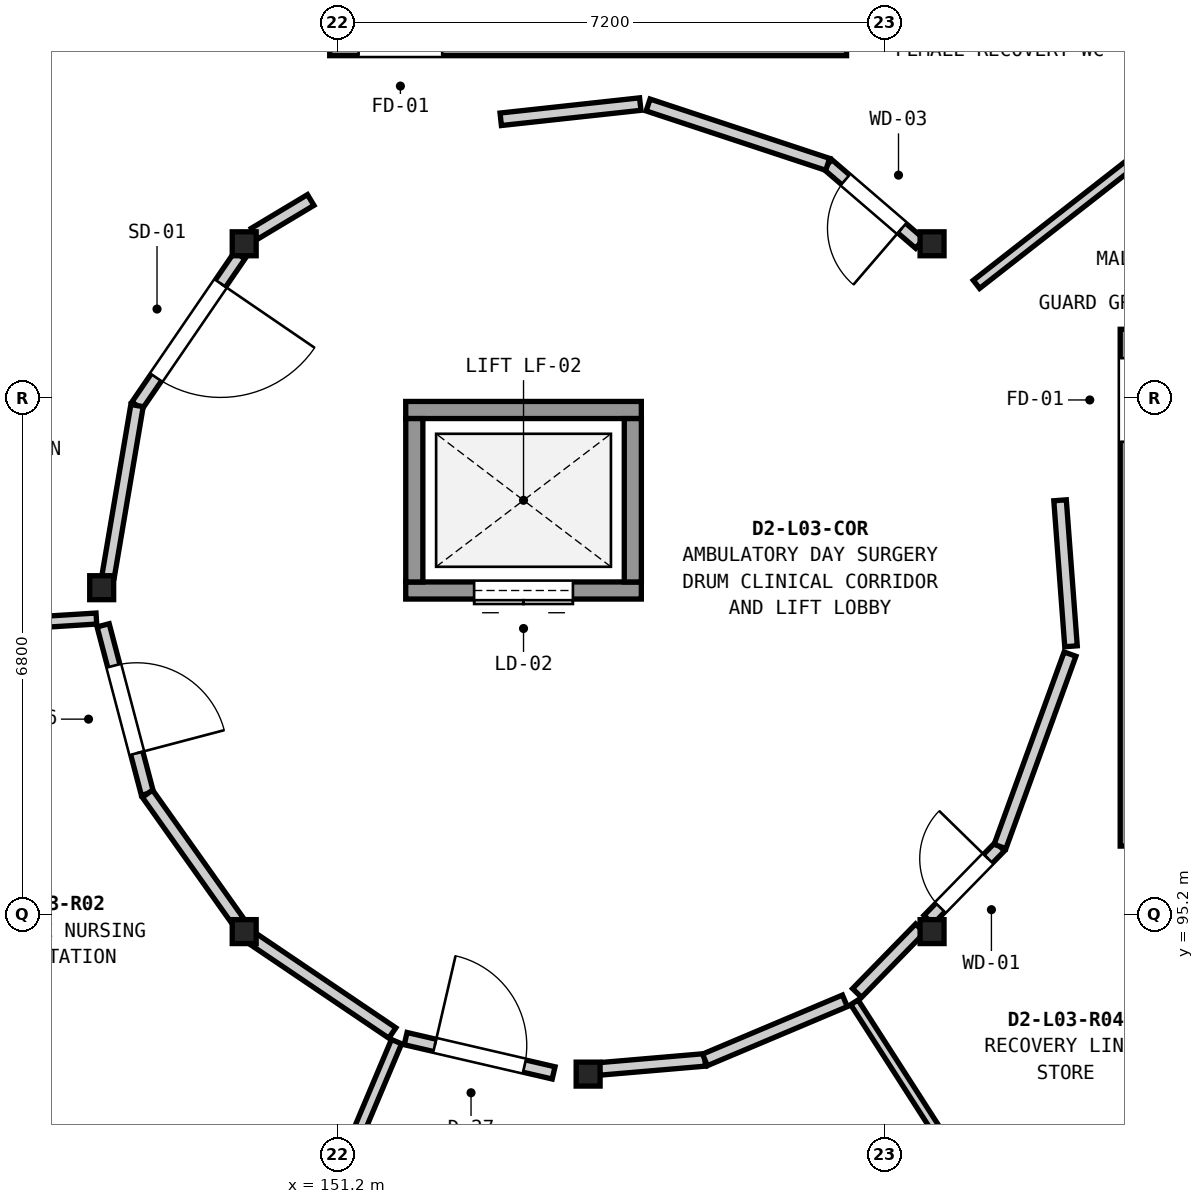
"""IFC4 building model, lengths in metres.
Left out: names, types, materials, properties, quantities, classifications, styles, units other than length and angle.
Written with IfcOpenShell. Run it as: python <this file> out.ifc"""

import sys

from ifc_helpers import new_model, si_unit, direction, frame, frame_2d, origin, origin_2d, place, context, subcontext, project, spatial, rectangle, extrude, element, fill, save


model = new_model("IFC4")
c1 = context("Model", 3, precision=1e-05, world=origin(), true_north=direction((0.0, 1.0)))
c2 = subcontext(c1, "Body", "Model", "MODEL_VIEW")
j1 = project(units=[si_unit("LENGTHUNIT", "METRE"), si_unit("PLANEANGLEUNIT", "RADIAN")], contexts=[c1])
p1 = place(None, origin())
s1 = spatial("IfcSite", under=j1, at=p1, CompositionType="ELEMENT")
p2 = place(p1, origin())
s2 = spatial("IfcBuilding", under=s1, at=p2, CompositionType="ELEMENT")
p3 = place(p2, frame((0.0, 0.0, 12.95)))
s3 = spatial("IfcBuildingStorey", under=s2, at=p3, CompositionType="ELEMENT", Elevation=12.95)
for number, where, z_axis, x_axis in (
    (1, (159.025, 104.025, 0.0), (0.0, 0.0, 1.0), (1.0, 0.0, 0.0)),
    (2, (149.975, 104.025, 0.0), (0.0, 0.0, 1.0), (1.0, 0.0, 0.0)),
    (3, (148.1, 99.5, 0.0), (0.0, 0.0, 1.0), (1.0, 0.0, 0.0)),
    (4, (149.975, 94.975, 0.0), (0.0, 0.0, 1.0), (1.0, 0.0, 0.0)),
    (5, (154.5, 93.1, 0.0), (0.0, 0.0, 1.0), (1.0, 0.0, 0.0)),
    (6, (159.025, 94.975, 0.0), (0.0, 0.0, 1.0), (1.0, 0.0, 0.0)),
):
    element("IfcColumn", number, at=place(p3, frame(where, z_axis=z_axis, x_axis=x_axis)), inside=s3, PredefinedType="COLUMN", context=c2, shape_type="SweptSolid", body=[
        extrude(rectangle(XDim=0.315, YDim=0.315, at=origin_2d()), origin(), (0.0, 0.0, 1.0), 4.2),
    ])
p4 = place(p3, frame((161.6, 102.9, 0.0), z_axis=(0.0, 0.0, 1.0), x_axis=(0.0, -1.0, 0.0)))
e7 = element("IfcWall", 7, at=p4, inside=s3, PredefinedType="SHEAR", context=c2, shape_type="SweptSolid", body=[
    extrude(rectangle(XDim=6.8, YDim=0.2, at=frame_2d((3.4, 0.0))), origin(), (0.0, 0.0, 1.0), 3.96),
])
p5 = place(p4, frame((0.38, 0.0, 0.0)))
e8 = element("IfcOpeningElement", 8, at=p5, cuts=e7, PredefinedType="OPENING", context=c2, shape_type="SweptSolid", body=[
    extrude(rectangle(XDim=1.1, YDim=2.15, at=frame_2d((0.55, 1.075))), frame((0.0, 0.11, 0.0), z_axis=(0.0, -1.0, 0.0), x_axis=(1.0, 0.0, 0.0)), (0.0, 0.0, 1.0), 0.22),
])
p6 = place(p3, frame((151.1, 106.6, 0.0), z_axis=(0.0, 0.0, 1.0), x_axis=(1.0, 0.0, 0.0)))
e9 = element("IfcWall", 9, at=p6, inside=s3, PredefinedType="SHEAR", context=c2, shape_type="SweptSolid", body=[
    extrude(rectangle(XDim=6.8, YDim=0.2, at=frame_2d((3.4, 0.0))), origin(), (0.0, 0.0, 1.0), 3.96),
])
p7 = place(p6, frame((0.38, 0.0, 0.0)))
e10 = element("IfcOpeningElement", 10, at=p7, cuts=e9, PredefinedType="OPENING", context=c2, shape_type="SweptSolid", body=[
    extrude(rectangle(XDim=1.1, YDim=2.15, at=frame_2d((0.55, 1.075))), frame((0.0, 0.11, 0.0), z_axis=(0.0, -1.0, 0.0), x_axis=(1.0, 0.0, 0.0)), (0.0, 0.0, 1.0), 0.22),
])
p8 = place(p3, frame((152.1, 99.463, 0.0), z_axis=(0.0, 0.0, 1.0), x_axis=(1.0, 0.0, 0.0)))
e11 = element("IfcWall", 11, at=p8, inside=s3, PredefinedType="SHEAR", context=c2, shape_type="SweptSolid", body=[
    extrude(rectangle(XDim=3.1, YDim=0.225, at=frame_2d((1.55, 0.0))), origin(), (0.0, 0.0, 1.0), 3.96),
])
p9 = place(p8, frame((0.9, 0.0, 0.0)))
e12 = element("IfcOpeningElement", 12, at=p9, cuts=e11, PredefinedType="OPENING", context=c2, shape_type="SweptSolid", body=[
    extrude(rectangle(XDim=1.3, YDim=2.2, at=frame_2d((0.65, 1.1))), frame((0.0, 0.123, 0.0), z_axis=(0.0, -1.0, 0.0), x_axis=(1.0, 0.0, 0.0)), (0.0, 0.0, 1.0), 0.245),
])
p10 = place(p3, frame((152.1, 101.838, 0.0), z_axis=(0.0, 0.0, 1.0), x_axis=(1.0, 0.0, 0.0)))
e13 = element("IfcWall", 13, at=p10, inside=s3, PredefinedType="SHEAR", context=c2, shape_type="SweptSolid", body=[
    extrude(rectangle(XDim=3.1, YDim=0.225, at=frame_2d((1.55, 0.0))), origin(), (0.0, 0.0, 1.0), 3.96),
])
for number, where, z_axis, x_axis in (
    (14, (152.213, 99.575, 0.0), (0.0, 0.0, 1.0), (0.0, 1.0, 0.0)),
    (15, (155.088, 99.575, 0.0), (0.0, 0.0, 1.0), (0.0, 1.0, 0.0)),
):
    element("IfcWall", number, at=place(p3, frame(where, z_axis=z_axis, x_axis=x_axis)), inside=s3, PredefinedType="SHEAR", context=c2, shape_type="SweptSolid", body=[
        extrude(rectangle(XDim=2.15, YDim=0.225, at=frame_2d((1.075, 0.0))), origin(), (0.0, 0.0, 1.0), 3.96),
    ])
p11 = place(p3, frame((148.03, 99.094, 0.0), z_axis=(0.0, 0.0, 1.0), x_axis=(-0.998041214069, -0.062559851498, 0.0)))
e16 = element("IfcWall", 16, at=p11, inside=s3, PredefinedType="PARTITIONING", context=c2, shape_type="SweptSolid", body=[
    extrude(rectangle(XDim=4.269, YDim=0.145, at=frame_2d((2.135, 0.0))), origin(), (0.0, 0.0, 1.0), 3.279),
])
p12 = place(p3, frame((151.979, 93.527, 0.0), z_axis=(0.0, 0.0, 1.0), x_axis=(-0.388824533624, -0.921311826719, 0.0)))
e17 = element("IfcWall", 17, at=p12, inside=s3, PredefinedType="PARTITIONING", context=c2, shape_type="SweptSolid", body=[
    extrude(rectangle(XDim=4.308, YDim=0.145, at=frame_2d((2.154, 0.0))), origin(), (0.0, 0.0, 1.0), 3.279),
])
p13 = place(p3, frame((158.003, 94.045, 0.0), z_axis=(0.0, 0.0, 1.0), x_axis=(0.540341175476, -0.841446025652, 0.0)))
e18 = element("IfcWall", 18, at=p13, inside=s3, PredefinedType="PARTITIONING", context=c2, shape_type="SweptSolid", body=[
    extrude(rectangle(XDim=4.297, YDim=0.115, at=frame_2d((2.149, 0.0))), origin(), (0.0, 0.0, 1.0), 3.279),
])
p14 = place(p3, frame((159.609, 103.491, 0.0), z_axis=(0.0, 0.0, 1.0), x_axis=(0.787898546349, 0.615805067096, 0.0)))
e19 = element("IfcWall", 19, at=p14, inside=s3, PredefinedType="PLUMBINGWALL", context=c2, shape_type="SweptSolid", body=[
    extrude(rectangle(XDim=4.266, YDim=0.135, at=frame_2d((2.133, 0.0))), origin(), (0.0, 0.0, 1.0), 3.279),
])
p15 = place(p3, frame((155.186, 105.863, 0.0), z_axis=(0.0, 0.0, 1.0), x_axis=(-0.994121595033, -0.108269359885, 0.0)))
e20 = element("IfcWall", 20, at=p15, inside=s3, PredefinedType="PARTITIONING", context=c2, shape_type="SweptSolid", body=[
    extrude(rectangle(XDim=1.847, YDim=0.165, at=frame_2d((0.923, 0.0))), origin(), (0.0, 0.0, 1.0), 3.279),
])
p16 = place(p3, frame((150.85, 104.601, 0.0), z_axis=(0.0, 0.0, 1.0), x_axis=(-0.857642888026, -0.514245735635, 0.0)))
e21 = element("IfcWall", 21, at=p16, inside=s3, PredefinedType="PARTITIONING", context=c2, shape_type="SweptSolid", body=[
    extrude(rectangle(XDim=0.862, YDim=0.165, at=frame_2d((0.431, 0.0))), origin(), (0.0, 0.0, 1.0), 3.279),
])
p17 = place(p3, frame((149.917, 103.873, 0.0), z_axis=(0.0, 0.0, 1.0), x_axis=(-0.564493885853, -0.825437249483, 0.0)))
e22 = element("IfcWall", 22, at=p17, inside=s3, PredefinedType="PARTITIONING", context=c2, shape_type="SweptSolid", body=[
    extrude(rectangle(XDim=2.395, YDim=0.165, at=frame_2d((1.198, 0.0))), origin(), (0.0, 0.0, 1.0), 3.279),
])
p18 = place(p17, frame((0.448, 0.0, 0.0)))
e23 = element("IfcOpeningElement", 23, at=p18, cuts=e22, PredefinedType="OPENING", context=c2, shape_type="SweptSolid", body=[
    extrude(rectangle(XDim=1.5, YDim=2.3, at=frame_2d((0.75, 1.15))), frame((0.0, 0.093, 0.0), z_axis=(0.0, -1.0, 0.0), x_axis=(1.0, 0.0, 0.0)), (0.0, 0.0, 1.0), 0.185),
])
p19 = place(p3, frame((148.565, 101.896, 0.0), z_axis=(0.0, 0.0, 1.0), x_axis=(-0.166872665665, -0.985978454863, 0.0)))
e24 = element("IfcWall", 24, at=p19, inside=s3, PredefinedType="PARTITIONING", context=c2, shape_type="SweptSolid", body=[
    extrude(rectangle(XDim=2.288, YDim=0.165, at=frame_2d((1.144, 0.0))), origin(), (0.0, 0.0, 1.0), 3.279),
])
p20 = place(p3, frame((148.119, 99.005, 0.0), z_axis=(0.0, 0.0, 1.0), x_axis=(0.254556263421, -0.96705796556, 0.0)))
e25 = element("IfcWall", 25, at=p20, inside=s3, PredefinedType="PARTITIONING", context=c2, shape_type="SweptSolid", body=[
    extrude(rectangle(XDim=2.29, YDim=0.165, at=frame_2d((1.145, 0.0))), origin(), (0.0, 0.0, 1.0), 3.279),
])
p21 = place(p20, frame((0.55, 0.0, 0.0)))
e26 = element("IfcOpeningElement", 26, at=p21, cuts=e25, PredefinedType="OPENING", context=c2, shape_type="SweptSolid", body=[
    extrude(rectangle(XDim=1.19, YDim=2.26, at=frame_2d((0.595, 1.13))), frame((0.0, 0.093, 0.0), z_axis=(0.0, -1.0, 0.0), x_axis=(1.0, 0.0, 0.0)), (0.0, 0.0, 1.0), 0.185),
])
p22 = place(p3, frame((148.702, 96.79, 0.0), z_axis=(0.0, 0.0, 1.0), x_axis=(0.578673092917, -0.815559594103, 0.0)))
e27 = element("IfcWall", 27, at=p22, inside=s3, PredefinedType="PARTITIONING", context=c2, shape_type="SweptSolid", body=[
    extrude(rectangle(XDim=2.055, YDim=0.165, at=frame_2d((1.028, 0.0))), origin(), (0.0, 0.0, 1.0), 3.279),
])
p23 = place(p3, frame((150.101, 94.873, 0.0), z_axis=(0.0, 0.0, 1.0), x_axis=(0.828551404548, -0.55991300219, 0.0)))
e28 = element("IfcWall", 28, at=p23, inside=s3, PredefinedType="PARTITIONING", context=c2, shape_type="SweptSolid", body=[
    extrude(rectangle(XDim=2.2, YDim=0.165, at=frame_2d((1.1, 0.0))), origin(), (0.0, 0.0, 1.0), 3.279),
])
p24 = place(p3, frame((152.099, 93.567, 0.0), z_axis=(0.0, 0.0, 1.0), x_axis=(0.97420761257, -0.225653556611, 0.0)))
e29 = element("IfcWall", 29, at=p24, inside=s3, PredefinedType="PARTITIONING", context=c2, shape_type="SweptSolid", body=[
    extrude(rectangle(XDim=1.998, YDim=0.165, at=frame_2d((0.999, 0.0))), origin(), (0.0, 0.0, 1.0), 3.279),
])
p25 = place(p24, frame((0.394, 0.0, 0.0)))
e30 = element("IfcOpeningElement", 30, at=p25, cuts=e29, PredefinedType="OPENING", context=c2, shape_type="SweptSolid", body=[
    extrude(rectangle(XDim=1.21, YDim=2.16, at=frame_2d((0.605, 1.08))), frame((0.0, 0.093, 0.0), z_axis=(0.0, -1.0, 0.0), x_axis=(1.0, 0.0, 0.0)), (0.0, 0.0, 1.0), 0.185),
])
p26 = place(p3, frame((154.647, 93.168, 0.0), z_axis=(0.0, 0.0, 1.0), x_axis=(0.996347499796, 0.085391215297, 0.0)))
e31 = element("IfcWall", 31, at=p26, inside=s3, PredefinedType="PARTITIONING", context=c2, shape_type="SweptSolid", body=[
    extrude(rectangle(XDim=1.395, YDim=0.165, at=frame_2d((0.698, 0.0))), origin(), (0.0, 0.0, 1.0), 3.279),
])
p27 = place(p3, frame((156.037, 93.287, 0.0), z_axis=(0.0, 0.0, 1.0), x_axis=(0.9213176586, 0.38881071481, 0.0)))
e32 = element("IfcWall", 32, at=p27, inside=s3, PredefinedType="PARTITIONING", context=c2, shape_type="SweptSolid", body=[
    extrude(rectangle(XDim=1.998, YDim=0.165, at=frame_2d((0.999, 0.0))), origin(), (0.0, 0.0, 1.0), 3.279),
])
p28 = place(p3, frame((158.038, 94.167, 0.0), z_axis=(0.0, 0.0, 1.0), x_axis=(0.698115930022, 0.715984740235, 0.0)))
e33 = element("IfcWall", 33, at=p28, inside=s3, PredefinedType="PARTITIONING", context=c2, shape_type="SweptSolid", body=[
    extrude(rectangle(XDim=1.189, YDim=0.165, at=frame_2d((0.594, 0.0))), origin(), (0.0, 0.0, 1.0), 3.279),
])
p29 = place(p3, frame((158.978, 95.131, 0.0), z_axis=(0.0, 0.0, 1.0), x_axis=(0.698536724788, 0.715574205881, 0.0)))
e34 = element("IfcWall", 34, at=p29, inside=s3, PredefinedType="PARTITIONING", context=c2, shape_type="SweptSolid", body=[
    extrude(rectangle(XDim=1.347, YDim=0.165, at=frame_2d((0.673, 0.0))), origin(), (0.0, 0.0, 1.0), 3.279),
])
p30 = place(p29, frame((0.223, 0.0, 0.0)))
e35 = element("IfcOpeningElement", 35, at=p30, cuts=e34, PredefinedType="OPENING", context=c2, shape_type="SweptSolid", body=[
    extrude(rectangle(XDim=0.9, YDim=2.1, at=frame_2d((0.45, 1.05))), frame((0.0, 0.093, 0.0), z_axis=(0.0, -1.0, 0.0), x_axis=(1.0, 0.0, 0.0)), (0.0, 0.0, 1.0), 0.185),
])
p31 = place(p3, frame((159.919, 96.095, 0.0), z_axis=(0.0, 0.0, 1.0), x_axis=(0.341997778508, 0.939700760612, 0.0)))
e36 = element("IfcWall", 36, at=p31, inside=s3, PredefinedType="PARTITIONING", context=c2, shape_type="SweptSolid", body=[
    extrude(rectangle(XDim=2.693, YDim=0.165, at=frame_2d((1.347, 0.0))), origin(), (0.0, 0.0, 1.0), 3.279),
])
p32 = place(p3, frame((160.853, 98.729, 0.0), z_axis=(0.0, 0.0, 1.0), x_axis=(-0.074777345003, 0.997200255051, 0.0)))
e37 = element("IfcWall", 37, at=p32, inside=s3, PredefinedType="PARTITIONING", context=c2, shape_type="SweptSolid", body=[
    extrude(rectangle(XDim=1.926, YDim=0.165, at=frame_2d((0.963, 0.0))), origin(), (0.0, 0.0, 1.0), 3.279),
])
p33 = place(p3, frame((158.863, 104.028, 0.0), z_axis=(0.0, 0.0, 1.0), x_axis=(-0.758003845194, 0.652250082921, 0.0)))
e38 = element("IfcWall", 38, at=p33, inside=s3, PredefinedType="PARTITIONING", context=c2, shape_type="SweptSolid", body=[
    extrude(rectangle(XDim=1.598, YDim=0.165, at=frame_2d((0.799, 0.0))), origin(), (0.0, 0.0, 1.0), 3.279),
])
p34 = place(p33, frame((0.309, 0.0, 0.0)))
e39 = element("IfcOpeningElement", 39, at=p34, cuts=e38, PredefinedType="OPENING", context=c2, shape_type="SweptSolid", body=[
    extrude(rectangle(XDim=0.98, YDim=2.1, at=frame_2d((0.49, 1.05))), frame((0.0, 0.093, 0.0), z_axis=(0.0, -1.0, 0.0), x_axis=(1.0, 0.0, 0.0)), (0.0, 0.0, 1.0), 0.185),
])
p35 = place(p3, frame((157.652, 105.07, 0.0), z_axis=(0.0, 0.0, 1.0), x_axis=(-0.949484627373, 0.313813547161, 0.0)))
e40 = element("IfcWall", 40, at=p35, inside=s3, PredefinedType="PARTITIONING", context=c2, shape_type="SweptSolid", body=[
    extrude(rectangle(XDim=2.489, YDim=0.165, at=frame_2d((1.244, 0.0))), origin(), (0.0, 0.0, 1.0), 3.279),
])
p36 = place(p9, origin())
e41 = element("IfcDoor", 41, at=p36, inside=s3, OperationType="DOUBLE_DOOR_SLIDING", PredefinedType="DOOR", context=c2, shape_type="SweptSolid", body=[
    extrude(rectangle(XDim=1.3, YDim=2.2, at=frame_2d((0.65, 1.1))), frame((0.0, 0.025, 0.0), z_axis=(0.0, -1.0, 0.0), x_axis=(1.0, 0.0, 0.0)), (0.0, 0.0, 1.0), 0.05),
])
fill(e12, e41)
p37 = place(p18, origin())
e42 = element("IfcDoor", 42, at=p37, inside=s3, OperationType="SINGLE_SWING_LEFT", PredefinedType="DOOR", context=c2, shape_type="SweptSolid", body=[
    extrude(rectangle(XDim=1.5, YDim=2.3, at=frame_2d((0.75, 1.15))), frame((0.0, 0.025, 0.0), z_axis=(0.0, -1.0, 0.0), x_axis=(1.0, 0.0, 0.0)), (0.0, 0.0, 1.0), 0.05),
])
fill(e23, e42)
p38 = place(p21, origin())
e43 = element("IfcDoor", 43, at=p38, inside=s3, OperationType="SINGLE_SWING_RIGHT", PredefinedType="DOOR", context=c2, shape_type="SweptSolid", body=[
    extrude(rectangle(XDim=1.19, YDim=2.26, at=frame_2d((0.595, 1.13))), frame((0.0, 0.025, 0.0), z_axis=(0.0, -1.0, 0.0), x_axis=(1.0, 0.0, 0.0)), (0.0, 0.0, 1.0), 0.05),
])
fill(e26, e43)
p39 = place(p25, origin())
e44 = element("IfcDoor", 44, at=p39, inside=s3, OperationType="SINGLE_SWING_LEFT", PredefinedType="DOOR", context=c2, shape_type="SweptSolid", body=[
    extrude(rectangle(XDim=1.21, YDim=2.16, at=frame_2d((0.605, 1.08))), frame((0.0, 0.025, 0.0), z_axis=(0.0, -1.0, 0.0), x_axis=(1.0, 0.0, 0.0)), (0.0, 0.0, 1.0), 0.05),
])
fill(e30, e44)
p40 = place(p30, origin())
e45 = element("IfcDoor", 45, at=p40, inside=s3, OperationType="SINGLE_SWING_RIGHT", PredefinedType="DOOR", context=c2, shape_type="SweptSolid", body=[
    extrude(rectangle(XDim=0.9, YDim=2.1, at=frame_2d((0.45, 1.05))), frame((0.0, 0.025, 0.0), z_axis=(0.0, -1.0, 0.0), x_axis=(1.0, 0.0, 0.0)), (0.0, 0.0, 1.0), 0.05),
])
fill(e35, e45)
p41 = place(p34, origin())
e46 = element("IfcDoor", 46, at=p41, inside=s3, OperationType="SINGLE_SWING_LEFT", PredefinedType="DOOR", context=c2, shape_type="SweptSolid", body=[
    extrude(rectangle(XDim=0.98, YDim=2.1, at=frame_2d((0.49, 1.05))), frame((0.0, 0.025, 0.0), z_axis=(0.0, -1.0, 0.0), x_axis=(1.0, 0.0, 0.0)), (0.0, 0.0, 1.0), 0.05),
])
fill(e39, e46)
save(model, sys.argv[1])
